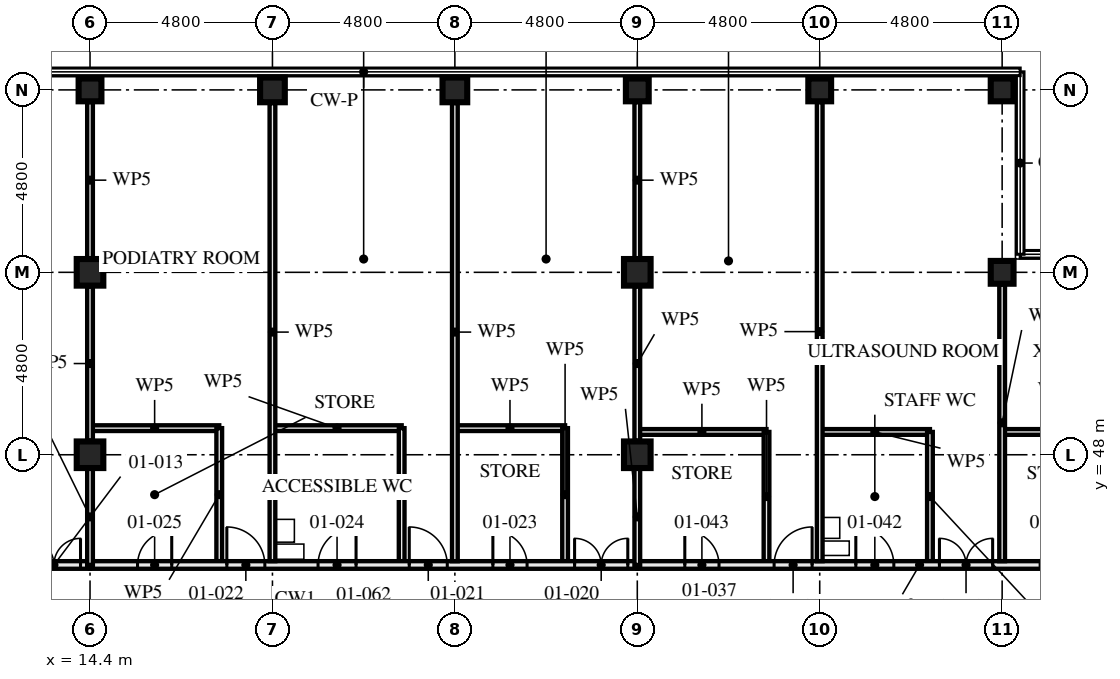
"""IFC4 building model, lengths in metres.
Left out: names, types, materials, properties, quantities, classifications, styles, units other than length and angle.
Written with IfcOpenShell. Run it as: python <this file> out.ifc"""

import sys

from ifc_helpers import new_model, si_unit, direction, frame, frame_2d, origin, origin_2d, place, context, subcontext, project, spatial, rectangle, hollow_rectangle, extrude, element, fill, save


model = new_model("IFC4")
c1 = context("Model", 3, precision=1e-05, world=origin(), true_north=direction((0.0, 1.0)))
c2 = subcontext(c1, "Body", "Model", "MODEL_VIEW")
j1 = project(units=[si_unit("LENGTHUNIT", "METRE"), si_unit("PLANEANGLEUNIT", "RADIAN")], contexts=[c1])
p1 = place(None, origin())
s1 = spatial("IfcSite", under=j1, at=p1, CompositionType="ELEMENT")
p2 = place(p1, origin())
s2 = spatial("IfcBuilding", under=s1, at=p2, CompositionType="ELEMENT")
p3 = place(p2, frame((0.0, 0.0, 4.5)))
s3 = spatial("IfcBuildingStorey", under=s2, at=p3, CompositionType="ELEMENT", Elevation=4.5)
for number, where, z_axis, x_axis in (
    (1, (14.4, 48.0, 0.0), (0.0, 0.0, 1.0), (1.0, 0.0, 0.0)),
    (2, (14.4, 52.8, 0.0), (0.0, 0.0, 1.0), (1.0, 0.0, 0.0)),
):
    element("IfcColumn", number, at=place(p3, frame(where, z_axis=z_axis, x_axis=x_axis)), inside=s3, PredefinedType="COLUMN", context=c2, shape_type="SweptSolid", body=[
        extrude(hollow_rectangle(XDim=0.7, YDim=0.7, WallThickness=0.06, at=origin_2d()), origin(), (0.0, 0.0, 1.0), 4.5),
    ])
p4 = place(p3, frame((14.4, 57.6, 0.0), z_axis=(0.0, 0.0, 1.0), x_axis=(0.0, 1.0, 0.0)))
e3 = element("IfcColumn", 3, at=p4, inside=s3, PredefinedType="COLUMN", context=c2, shape_type="SweptSolid", body=[
    extrude(hollow_rectangle(XDim=0.6, YDim=0.6, WallThickness=0.08, at=origin_2d()), origin(), (0.0, 0.0, 1.0), 4.5),
])
for number, where, z_axis, x_axis in (
    (4, (19.2, 57.6, 0.0), (0.0, 0.0, 1.0), (0.0, 1.0, 0.0)),
    (5, (24.0, 57.6, 0.0), (0.0, 0.0, 1.0), (0.0, 1.0, 0.0)),
):
    element("IfcColumn", number, at=place(p3, frame(where, z_axis=z_axis, x_axis=x_axis)), inside=s3, PredefinedType="COLUMN", context=c2, shape_type="SweptSolid", body=[
        extrude(hollow_rectangle(XDim=0.65, YDim=0.65, WallThickness=0.08, at=origin_2d()), origin(), (0.0, 0.0, 1.0), 4.5),
    ])
for number, where, z_axis, x_axis in (
    (6, (28.8, 48.0, 0.0), (0.0, 0.0, 1.0), (1.0, 0.0, 0.0)),
    (7, (28.8, 52.8, 0.0), (0.0, 0.0, 1.0), (1.0, 0.0, 0.0)),
):
    element("IfcColumn", number, at=place(p3, frame(where, z_axis=z_axis, x_axis=x_axis)), inside=s3, PredefinedType="COLUMN", context=c2, shape_type="SweptSolid", body=[
        extrude(hollow_rectangle(XDim=0.7, YDim=0.7, WallThickness=0.06, at=origin_2d()), origin(), (0.0, 0.0, 1.0), 4.5),
    ])
for number, where, z_axis, x_axis in (
    (8, (28.8, 57.6, 0.0), (0.0, 0.0, 1.0), (0.0, 1.0, 0.0)),
    (9, (33.6, 57.6, 0.0), (0.0, 0.0, 1.0), (0.0, 1.0, 0.0)),
):
    element("IfcColumn", number, at=place(p3, frame(where, z_axis=z_axis, x_axis=x_axis)), inside=s3, PredefinedType="COLUMN", context=c2, shape_type="SweptSolid", body=[
        extrude(hollow_rectangle(XDim=0.6, YDim=0.6, WallThickness=0.08, at=origin_2d()), origin(), (0.0, 0.0, 1.0), 4.5),
    ])
for number, where, z_axis, x_axis in (
    (10, (38.4, 52.8, 0.0), (0.0, 0.0, 1.0), (0.0, 1.0, 0.0)),
    (11, (38.4, 57.6, 0.0), (0.0, 0.0, 1.0), (0.0, 1.0, 0.0)),
):
    element("IfcColumn", number, at=place(p3, frame(where, z_axis=z_axis, x_axis=x_axis)), inside=s3, PredefinedType="COLUMN", context=c2, shape_type="SweptSolid", body=[
        extrude(hollow_rectangle(XDim=0.6, YDim=0.6, WallThickness=0.06, at=origin_2d()), origin(), (0.0, 0.0, 1.0), 4.5),
    ])
p5 = place(p3, frame((14.4, 45.1, 0.0), z_axis=(0.0, 0.0, 1.0), x_axis=(-1.0, 0.0, 0.0)))
e12 = element("IfcWall", 12, at=p5, inside=s3, PredefinedType="PARTITIONING", context=c2, shape_type="SweptSolid", body=[
    extrude(rectangle(XDim=14.855, YDim=0.2, at=frame_2d((7.427, 0.0))), origin(), (0.0, 0.0, 1.0), 3.32),
])
p6 = place(p5, frame((0.25, 0.0, 0.0)))
e13 = element("IfcOpeningElement", 13, at=p6, cuts=e12, PredefinedType="OPENING", context=c2, shape_type="SweptSolid", body=[
    extrude(rectangle(XDim=1.4, YDim=2.4, at=frame_2d((0.7, 1.2))), frame((0.0, 0.111, 0.0), z_axis=(0.0, -1.0, 0.0), x_axis=(1.0, 0.0, 0.0)), (0.0, 0.0, 1.0), 0.221),
])
p7 = place(p5, frame((5.05, 0.0, 0.0)))
e14 = element("IfcOpeningElement", 14, at=p7, cuts=e12, PredefinedType="OPENING", context=c2, shape_type="SweptSolid", body=[
    extrude(rectangle(XDim=1.4, YDim=2.4, at=frame_2d((0.7, 1.2))), frame((0.0, 0.111, 0.0), z_axis=(0.0, -1.0, 0.0), x_axis=(1.0, 0.0, 0.0)), (0.0, 0.0, 1.0), 0.221),
])
p8 = place(p5, frame((9.8, 0.0, 0.0)))
e15 = element("IfcOpeningElement", 15, at=p8, cuts=e12, PredefinedType="OPENING", context=c2, shape_type="SweptSolid", body=[
    extrude(rectangle(XDim=1.0, YDim=2.4, at=frame_2d((0.5, 1.2))), frame((0.0, 0.111, 0.0), z_axis=(0.0, -1.0, 0.0), x_axis=(1.0, 0.0, 0.0)), (0.0, 0.0, 1.0), 0.221),
])
p9 = place(p5, frame((2.9, 0.0, 0.0)))
e16 = element("IfcOpeningElement", 16, at=p9, cuts=e12, PredefinedType="OPENING", context=c2, shape_type="SweptSolid", body=[
    extrude(rectangle(XDim=0.9, YDim=2.1, at=frame_2d((0.45, 1.05))), frame((0.0, 0.111, 0.0), z_axis=(0.0, -1.0, 0.0), x_axis=(1.0, 0.0, 0.0)), (0.0, 0.0, 1.0), 0.221),
])
p10 = place(p5, frame((7.65, 0.0, 0.0)))
e17 = element("IfcOpeningElement", 17, at=p10, cuts=e12, PredefinedType="OPENING", context=c2, shape_type="SweptSolid", body=[
    extrude(rectangle(XDim=1.0, YDim=2.1, at=frame_2d((0.5, 1.05))), frame((0.0, 0.111, 0.0), z_axis=(0.0, -1.0, 0.0), x_axis=(1.0, 0.0, 0.0)), (0.0, 0.0, 1.0), 0.221),
])
p11 = place(p5, frame((12.25, 0.0, 0.0)))
e18 = element("IfcOpeningElement", 18, at=p11, cuts=e12, PredefinedType="OPENING", context=c2, shape_type="SweptSolid", body=[
    extrude(rectangle(XDim=0.9, YDim=2.1, at=frame_2d((0.45, 1.05))), frame((0.0, 0.111, 0.0), z_axis=(0.0, -1.0, 0.0), x_axis=(1.0, 0.0, 0.0)), (0.0, 0.0, 1.0), 0.221),
])
p12 = place(p3, frame((26.9, 48.7, 0.0), z_axis=(0.0, 0.0, 1.0), x_axis=(0.0, -1.0, 0.0)))
e19 = element("IfcWall", 19, at=p12, inside=s3, PredefinedType="PARTITIONING", context=c2, shape_type="SweptSolid", body=[
    extrude(rectangle(XDim=3.5, YDim=0.15, at=frame_2d((1.75, 0.0))), origin(), (0.0, 0.0, 1.0), 3.55),
])
p13 = place(p3, frame((26.9, 48.7, 0.0), z_axis=(0.0, 0.0, 1.0), x_axis=(-1.0, 0.0, 0.0)))
e20 = element("IfcWall", 20, at=p13, inside=s3, PredefinedType="PARTITIONING", context=c2, shape_type="SweptSolid", body=[
    extrude(rectangle(XDim=2.9, YDim=0.15, at=frame_2d((1.45, 0.0))), origin(), (0.0, 0.0, 1.0), 4.33),
])
p14 = place(p3, frame((22.6, 48.7, 0.0), z_axis=(0.0, 0.0, 1.0), x_axis=(0.0, -1.0, 0.0)))
e21 = element("IfcWall", 21, at=p14, inside=s3, PredefinedType="PARTITIONING", context=c2, shape_type="SweptSolid", body=[
    extrude(rectangle(XDim=3.5, YDim=0.15, at=frame_2d((1.75, 0.0))), origin(), (0.0, 0.0, 1.0), 3.55),
])
p15 = place(p3, frame((22.6, 48.7, 0.0), z_axis=(0.0, 0.0, 1.0), x_axis=(-1.0, 0.0, 0.0)))
e22 = element("IfcWall", 22, at=p15, inside=s3, PredefinedType="PARTITIONING", context=c2, shape_type="SweptSolid", body=[
    extrude(rectangle(XDim=3.4, YDim=0.15, at=frame_2d((1.7, 0.0))), origin(), (0.0, 0.0, 1.0), 4.33),
])
p16 = place(p3, frame((17.8, 48.7, 0.0), z_axis=(0.0, 0.0, 1.0), x_axis=(0.0, -1.0, 0.0)))
e23 = element("IfcWall", 23, at=p16, inside=s3, PredefinedType="PARTITIONING", context=c2, shape_type="SweptSolid", body=[
    extrude(rectangle(XDim=3.5, YDim=0.15, at=frame_2d((1.75, 0.0))), origin(), (0.0, 0.0, 1.0), 3.55),
])
p17 = place(p3, frame((17.8, 48.7, 0.0), z_axis=(0.0, 0.0, 1.0), x_axis=(-1.0, 0.0, 0.0)))
e24 = element("IfcWall", 24, at=p17, inside=s3, PredefinedType="PARTITIONING", context=c2, shape_type="SweptSolid", body=[
    extrude(rectangle(XDim=3.4, YDim=0.15, at=frame_2d((1.7, 0.0))), origin(), (0.0, 0.0, 1.0), 4.33),
])
for number, where, z_axis, x_axis in (
    (25, (24.0, 57.255, 0.0), (0.0, 0.0, 1.0), (0.0, -1.0, 0.0)),
    (26, (19.2, 57.255, 0.0), (0.0, 0.0, 1.0), (0.0, -1.0, 0.0)),
):
    element("IfcWall", number, at=place(p3, frame(where, z_axis=z_axis, x_axis=x_axis)), inside=s3, PredefinedType="PARTITIONING", context=c2, shape_type="SweptSolid", body=[
        extrude(rectangle(XDim=12.055, YDim=0.15, at=frame_2d((6.027, 0.0))), origin(), (0.0, 0.0, 1.0), 3.55),
    ])
p18 = place(p3, frame((28.8, 45.1, 0.0), z_axis=(0.0, 0.0, 1.0), x_axis=(-1.0, 0.0, 0.0)))
e27 = element("IfcWall", 27, at=p18, inside=s3, PredefinedType="PARTITIONING", context=c2, shape_type="SweptSolid", body=[
    extrude(rectangle(XDim=14.4, YDim=0.2, at=frame_2d((7.2, 0.0))), origin(), (0.0, 0.0, 1.0), 4.33),
])
p19 = place(p18, frame((0.25, 0.0, 0.0)))
e28 = element("IfcOpeningElement", 28, at=p19, cuts=e27, PredefinedType="OPENING", context=c2, shape_type="SweptSolid", body=[
    extrude(rectangle(XDim=1.4, YDim=2.4, at=frame_2d((0.7, 1.2))), frame((0.0, 0.111, 0.0), z_axis=(0.0, -1.0, 0.0), x_axis=(1.0, 0.0, 0.0)), (0.0, 0.0, 1.0), 0.221),
])
p20 = place(p18, frame((5.0, 0.0, 0.0)))
e29 = element("IfcOpeningElement", 29, at=p20, cuts=e27, PredefinedType="OPENING", context=c2, shape_type="SweptSolid", body=[
    extrude(rectangle(XDim=1.0, YDim=2.4, at=frame_2d((0.5, 1.2))), frame((0.0, 0.111, 0.0), z_axis=(0.0, -1.0, 0.0), x_axis=(1.0, 0.0, 0.0)), (0.0, 0.0, 1.0), 0.221),
])
p21 = place(p18, frame((9.8, 0.0, 0.0)))
e30 = element("IfcOpeningElement", 30, at=p21, cuts=e27, PredefinedType="OPENING", context=c2, shape_type="SweptSolid", body=[
    extrude(rectangle(XDim=1.0, YDim=2.4, at=frame_2d((0.5, 1.2))), frame((0.0, 0.111, 0.0), z_axis=(0.0, -1.0, 0.0), x_axis=(1.0, 0.0, 0.0)), (0.0, 0.0, 1.0), 0.221),
])
p22 = place(p18, frame((2.9, 0.0, 0.0)))
e31 = element("IfcOpeningElement", 31, at=p22, cuts=e27, PredefinedType="OPENING", context=c2, shape_type="SweptSolid", body=[
    extrude(rectangle(XDim=0.9, YDim=2.1, at=frame_2d((0.45, 1.05))), frame((0.0, 0.111, 0.0), z_axis=(0.0, -1.0, 0.0), x_axis=(1.0, 0.0, 0.0)), (0.0, 0.0, 1.0), 0.221),
])
p23 = place(p18, frame((7.4, 0.0, 0.0)))
e32 = element("IfcOpeningElement", 32, at=p23, cuts=e27, PredefinedType="OPENING", context=c2, shape_type="SweptSolid", body=[
    extrude(rectangle(XDim=1.0, YDim=2.1, at=frame_2d((0.5, 1.05))), frame((0.0, 0.111, 0.0), z_axis=(0.0, -1.0, 0.0), x_axis=(1.0, 0.0, 0.0)), (0.0, 0.0, 1.0), 0.221),
])
p24 = place(p18, frame((12.25, 0.0, 0.0)))
e33 = element("IfcOpeningElement", 33, at=p24, cuts=e27, PredefinedType="OPENING", context=c2, shape_type="SweptSolid", body=[
    extrude(rectangle(XDim=0.9, YDim=2.1, at=frame_2d((0.45, 1.05))), frame((0.0, 0.111, 0.0), z_axis=(0.0, -1.0, 0.0), x_axis=(1.0, 0.0, 0.0)), (0.0, 0.0, 1.0), 0.221),
])
p25 = place(p3, frame((41.3, 48.6, 0.0), z_axis=(0.0, 0.0, 1.0), x_axis=(-1.0, 0.0, 0.0)))
e34 = element("IfcWall", 34, at=p25, inside=s3, PredefinedType="PARTITIONING", context=c2, shape_type="SweptSolid", body=[
    extrude(rectangle(XDim=2.9, YDim=0.15, at=frame_2d((1.45, 0.0))), origin(), (0.0, 0.0, 1.0), 4.33),
])
p26 = place(p3, frame((36.5, 48.6, 0.0), z_axis=(0.0, 0.0, 1.0), x_axis=(0.0, -1.0, 0.0)))
e35 = element("IfcWall", 35, at=p26, inside=s3, PredefinedType="PARTITIONING", context=c2, shape_type="SweptSolid", body=[
    extrude(rectangle(XDim=3.4, YDim=0.15, at=frame_2d((1.7, 0.0))), origin(), (0.0, 0.0, 1.0), 3.32),
])
p27 = place(p3, frame((36.5, 48.6, 0.0), z_axis=(0.0, 0.0, 1.0), x_axis=(-1.0, 0.0, 0.0)))
e36 = element("IfcWall", 36, at=p27, inside=s3, PredefinedType="PARTITIONING", context=c2, shape_type="SweptSolid", body=[
    extrude(rectangle(XDim=2.9, YDim=0.15, at=frame_2d((1.45, 0.0))), origin(), (0.0, 0.0, 1.0), 4.33),
])
p28 = place(p3, frame((32.2, 48.6, 0.0), z_axis=(0.0, 0.0, 1.0), x_axis=(0.0, -1.0, 0.0)))
e37 = element("IfcWall", 37, at=p28, inside=s3, PredefinedType="PARTITIONING", context=c2, shape_type="SweptSolid", body=[
    extrude(rectangle(XDim=3.4, YDim=0.15, at=frame_2d((1.7, 0.0))), origin(), (0.0, 0.0, 1.0), 3.32),
])
p29 = place(p3, frame((32.2, 48.6, 0.0), z_axis=(0.0, 0.0, 1.0), x_axis=(-1.0, 0.0, 0.0)))
e38 = element("IfcWall", 38, at=p29, inside=s3, PredefinedType="PARTITIONING", context=c2, shape_type="SweptSolid", body=[
    extrude(rectangle(XDim=3.4, YDim=0.15, at=frame_2d((1.7, 0.0))), origin(), (0.0, 0.0, 1.0), 4.33),
])
p30 = place(p3, frame((38.4, 52.48, 0.0), z_axis=(0.0, 0.0, 1.0), x_axis=(0.0, -1.0, 0.0)))
e39 = element("IfcWall", 39, at=p30, inside=s3, PredefinedType="PARTITIONING", context=c2, shape_type="SweptSolid", body=[
    extrude(rectangle(XDim=7.28, YDim=0.15, at=frame_2d((3.64, 0.0))), origin(), (0.0, 0.0, 1.0), 3.32),
])
p31 = place(p3, frame((33.6, 57.28, 0.0), z_axis=(0.0, 0.0, 1.0), x_axis=(0.0, -1.0, 0.0)))
e40 = element("IfcWall", 40, at=p31, inside=s3, PredefinedType="PARTITIONING", context=c2, shape_type="SweptSolid", body=[
    extrude(rectangle(XDim=12.08, YDim=0.15, at=frame_2d((6.04, 0.0))), origin(), (0.0, 0.0, 1.0), 3.32),
])
p32 = place(p3, frame((43.655, 45.1, 0.0), z_axis=(0.0, 0.0, 1.0), x_axis=(-1.0, 0.0, 0.0)))
e41 = element("IfcWall", 41, at=p32, inside=s3, PredefinedType="PARTITIONING", context=c2, shape_type="SweptSolid", body=[
    extrude(rectangle(XDim=14.855, YDim=0.2, at=frame_2d((7.427, 0.0))), origin(), (0.0, 0.0, 1.0), 3.32),
])
p33 = place(p32, frame((0.705, 0.0, 0.0)))
e42 = element("IfcOpeningElement", 42, at=p33, cuts=e41, PredefinedType="OPENING", context=c2, shape_type="SweptSolid", body=[
    extrude(rectangle(XDim=1.4, YDim=2.4, at=frame_2d((0.7, 1.2))), frame((0.0, 0.111, 0.0), z_axis=(0.0, -1.0, 0.0), x_axis=(1.0, 0.0, 0.0)), (0.0, 0.0, 1.0), 0.221),
])
p34 = place(p32, frame((5.505, 0.0, 0.0)))
e43 = element("IfcOpeningElement", 43, at=p34, cuts=e41, PredefinedType="OPENING", context=c2, shape_type="SweptSolid", body=[
    extrude(rectangle(XDim=1.4, YDim=2.4, at=frame_2d((0.7, 1.2))), frame((0.0, 0.111, 0.0), z_axis=(0.0, -1.0, 0.0), x_axis=(1.0, 0.0, 0.0)), (0.0, 0.0, 1.0), 0.221),
])
p35 = place(p32, frame((10.255, 0.0, 0.0)))
e44 = element("IfcOpeningElement", 44, at=p35, cuts=e41, PredefinedType="OPENING", context=c2, shape_type="SweptSolid", body=[
    extrude(rectangle(XDim=1.0, YDim=2.4, at=frame_2d((0.5, 1.2))), frame((0.0, 0.111, 0.0), z_axis=(0.0, -1.0, 0.0), x_axis=(1.0, 0.0, 0.0)), (0.0, 0.0, 1.0), 0.221),
])
p36 = place(p32, frame((3.355, 0.0, 0.0)))
e45 = element("IfcOpeningElement", 45, at=p36, cuts=e41, PredefinedType="OPENING", context=c2, shape_type="SweptSolid", body=[
    extrude(rectangle(XDim=0.9, YDim=2.1, at=frame_2d((0.45, 1.05))), frame((0.0, 0.111, 0.0), z_axis=(0.0, -1.0, 0.0), x_axis=(1.0, 0.0, 0.0)), (0.0, 0.0, 1.0), 0.221),
])
p37 = place(p32, frame((8.105, 0.0, 0.0)))
e46 = element("IfcOpeningElement", 46, at=p37, cuts=e41, PredefinedType="OPENING", context=c2, shape_type="SweptSolid", body=[
    extrude(rectangle(XDim=1.0, YDim=2.1, at=frame_2d((0.5, 1.05))), frame((0.0, 0.111, 0.0), z_axis=(0.0, -1.0, 0.0), x_axis=(1.0, 0.0, 0.0)), (0.0, 0.0, 1.0), 0.221),
])
p38 = place(p32, frame((12.705, 0.0, 0.0)))
e47 = element("IfcOpeningElement", 47, at=p38, cuts=e41, PredefinedType="OPENING", context=c2, shape_type="SweptSolid", body=[
    extrude(rectangle(XDim=0.9, YDim=2.1, at=frame_2d((0.45, 1.05))), frame((0.0, 0.111, 0.0), z_axis=(0.0, -1.0, 0.0), x_axis=(1.0, 0.0, 0.0)), (0.0, 0.0, 1.0), 0.221),
])
p39 = place(p3, frame((14.4, 45.1, 0.0), z_axis=(0.0, 0.0, 1.0), x_axis=(0.0, 1.0, 0.0)))
e48 = element("IfcWall", 48, at=p39, inside=s3, PredefinedType="PARTITIONING", context=c2, shape_type="SweptSolid", body=[
    extrude(rectangle(XDim=2.53, YDim=0.15, at=frame_2d((1.265, 0.0))), origin(), (0.0, 0.0, 1.0), 3.32),
])
p40 = place(p3, frame((14.4, 48.37, 0.0), z_axis=(0.0, 0.0, 1.0), x_axis=(0.0, 1.0, 0.0)))
e49 = element("IfcWall", 49, at=p40, inside=s3, PredefinedType="PARTITIONING", context=c2, shape_type="SweptSolid", body=[
    extrude(rectangle(XDim=4.06, YDim=0.15, at=frame_2d((2.03, 0.0))), origin(), (0.0, 0.0, 1.0), 3.32),
])
p41 = place(p3, frame((14.4, 53.17, 0.0), z_axis=(0.0, 0.0, 1.0), x_axis=(0.0, 1.0, 0.0)))
e50 = element("IfcWall", 50, at=p41, inside=s3, PredefinedType="PARTITIONING", context=c2, shape_type="SweptSolid", body=[
    extrude(rectangle(XDim=4.11, YDim=0.15, at=frame_2d((2.055, 0.0))), origin(), (0.0, 0.0, 1.0), 3.32),
])
p42 = place(p3, frame((28.8, 45.1, 0.0), z_axis=(0.0, 0.0, 1.0), x_axis=(0.0, 1.0, 0.0)))
e51 = element("IfcWall", 51, at=p42, inside=s3, PredefinedType="PARTITIONING", context=c2, shape_type="SweptSolid", body=[
    extrude(rectangle(XDim=2.53, YDim=0.15, at=frame_2d((1.265, 0.0))), origin(), (0.0, 0.0, 1.0), 3.32),
])
p43 = place(p3, frame((28.8, 48.37, 0.0), z_axis=(0.0, 0.0, 1.0), x_axis=(0.0, 1.0, 0.0)))
e52 = element("IfcWall", 52, at=p43, inside=s3, PredefinedType="PARTITIONING", context=c2, shape_type="SweptSolid", body=[
    extrude(rectangle(XDim=4.06, YDim=0.15, at=frame_2d((2.03, 0.0))), origin(), (0.0, 0.0, 1.0), 3.32),
])
p44 = place(p3, frame((28.8, 53.17, 0.0), z_axis=(0.0, 0.0, 1.0), x_axis=(0.0, 1.0, 0.0)))
e53 = element("IfcWall", 53, at=p44, inside=s3, PredefinedType="PARTITIONING", context=c2, shape_type="SweptSolid", body=[
    extrude(rectangle(XDim=4.11, YDim=0.15, at=frame_2d((2.055, 0.0))), origin(), (0.0, 0.0, 1.0), 3.32),
])
p45 = place(p6, frame((1.4, 0.0, 0.0), z_axis=(0.0, 0.0, 1.0), x_axis=(-1.0, 0.0, 0.0)))
e54 = element("IfcDoor", 54, at=p45, inside=s3, OperationType="DOUBLE_DOOR_SINGLE_SWING", PredefinedType="DOOR", context=c2, shape_type="SweptSolid", body=[
    extrude(rectangle(XDim=1.4, YDim=2.4, at=frame_2d((0.7, 1.2))), frame((0.0, 0.027, 0.0), z_axis=(0.0, -1.0, 0.0), x_axis=(1.0, 0.0, 0.0)), (0.0, 0.0, 1.0), 0.054),
])
fill(e13, e54)
p46 = place(p19, frame((1.4, 0.0, 0.0), z_axis=(0.0, 0.0, 1.0), x_axis=(-1.0, 0.0, 0.0)))
e55 = element("IfcDoor", 55, at=p46, inside=s3, OperationType="DOUBLE_DOOR_SINGLE_SWING", PredefinedType="DOOR", context=c2, shape_type="SweptSolid", body=[
    extrude(rectangle(XDim=1.4, YDim=2.4, at=frame_2d((0.7, 1.2))), frame((0.0, 0.027, 0.0), z_axis=(0.0, -1.0, 0.0), x_axis=(1.0, 0.0, 0.0)), (0.0, 0.0, 1.0), 0.054),
])
fill(e28, e55)
p47 = place(p20, frame((1.0, 0.0, 0.0), z_axis=(0.0, 0.0, 1.0), x_axis=(-1.0, 0.0, 0.0)))
e56 = element("IfcDoor", 56, at=p47, inside=s3, OperationType="SINGLE_SWING_RIGHT", PredefinedType="DOOR", context=c2, shape_type="SweptSolid", body=[
    extrude(rectangle(XDim=1.0, YDim=2.4, at=frame_2d((0.5, 1.2))), frame((0.0, 0.027, 0.0), z_axis=(0.0, -1.0, 0.0), x_axis=(1.0, 0.0, 0.0)), (0.0, 0.0, 1.0), 0.054),
])
fill(e29, e56)
p48 = place(p21, frame((1.0, 0.0, 0.0), z_axis=(0.0, 0.0, 1.0), x_axis=(-1.0, 0.0, 0.0)))
e57 = element("IfcDoor", 57, at=p48, inside=s3, OperationType="SINGLE_SWING_RIGHT", PredefinedType="DOOR", context=c2, shape_type="SweptSolid", body=[
    extrude(rectangle(XDim=1.0, YDim=2.4, at=frame_2d((0.5, 1.2))), frame((0.0, 0.027, 0.0), z_axis=(0.0, -1.0, 0.0), x_axis=(1.0, 0.0, 0.0)), (0.0, 0.0, 1.0), 0.054),
])
fill(e30, e57)
p49 = place(p22, frame((0.9, 0.0, 0.0), z_axis=(0.0, 0.0, 1.0), x_axis=(-1.0, 0.0, 0.0)))
e58 = element("IfcDoor", 58, at=p49, inside=s3, OperationType="SINGLE_SWING_RIGHT", PredefinedType="DOOR", context=c2, shape_type="SweptSolid", body=[
    extrude(rectangle(XDim=0.9, YDim=2.1, at=frame_2d((0.45, 1.05))), frame((0.0, 0.027, 0.0), z_axis=(0.0, -1.0, 0.0), x_axis=(1.0, 0.0, 0.0)), (0.0, 0.0, 1.0), 0.054),
])
fill(e31, e58)
p50 = place(p23, frame((1.0, 0.0, 0.0), z_axis=(0.0, 0.0, 1.0), x_axis=(-1.0, 0.0, 0.0)))
e59 = element("IfcDoor", 59, at=p50, inside=s3, OperationType="SINGLE_SWING_LEFT", PredefinedType="DOOR", context=c2, shape_type="SweptSolid", body=[
    extrude(rectangle(XDim=1.0, YDim=2.1, at=frame_2d((0.5, 1.05))), frame((0.0, 0.027, 0.0), z_axis=(0.0, -1.0, 0.0), x_axis=(1.0, 0.0, 0.0)), (0.0, 0.0, 1.0), 0.054),
])
fill(e32, e59)
p51 = place(p24, frame((0.9, 0.0, 0.0), z_axis=(0.0, 0.0, 1.0), x_axis=(-1.0, 0.0, 0.0)))
e60 = element("IfcDoor", 60, at=p51, inside=s3, OperationType="SINGLE_SWING_LEFT", PredefinedType="DOOR", context=c2, shape_type="SweptSolid", body=[
    extrude(rectangle(XDim=0.9, YDim=2.1, at=frame_2d((0.45, 1.05))), frame((0.0, 0.027, 0.0), z_axis=(0.0, -1.0, 0.0), x_axis=(1.0, 0.0, 0.0)), (0.0, 0.0, 1.0), 0.054),
])
fill(e33, e60)
p52 = place(p34, frame((1.4, 0.0, 0.0), z_axis=(0.0, 0.0, 1.0), x_axis=(-1.0, 0.0, 0.0)))
e61 = element("IfcDoor", 61, at=p52, inside=s3, OperationType="DOUBLE_DOOR_SINGLE_SWING", PredefinedType="DOOR", context=c2, shape_type="SweptSolid", body=[
    extrude(rectangle(XDim=1.4, YDim=2.4, at=frame_2d((0.7, 1.2))), frame((0.0, 0.027, 0.0), z_axis=(0.0, -1.0, 0.0), x_axis=(1.0, 0.0, 0.0)), (0.0, 0.0, 1.0), 0.054),
])
fill(e43, e61)
p53 = place(p35, frame((1.0, 0.0, 0.0), z_axis=(0.0, 0.0, 1.0), x_axis=(-1.0, 0.0, 0.0)))
e62 = element("IfcDoor", 62, at=p53, inside=s3, OperationType="SINGLE_SWING_LEFT", PredefinedType="DOOR", context=c2, shape_type="SweptSolid", body=[
    extrude(rectangle(XDim=1.0, YDim=2.4, at=frame_2d((0.5, 1.2))), frame((0.0, 0.027, 0.0), z_axis=(0.0, -1.0, 0.0), x_axis=(1.0, 0.0, 0.0)), (0.0, 0.0, 1.0), 0.054),
])
fill(e44, e62)
p54 = place(p37, frame((1.0, 0.0, 0.0), z_axis=(0.0, 0.0, 1.0), x_axis=(-1.0, 0.0, 0.0)))
e63 = element("IfcDoor", 63, at=p54, inside=s3, OperationType="SINGLE_SWING_RIGHT", PredefinedType="DOOR", context=c2, shape_type="SweptSolid", body=[
    extrude(rectangle(XDim=1.0, YDim=2.1, at=frame_2d((0.5, 1.05))), frame((0.0, 0.027, 0.0), z_axis=(0.0, -1.0, 0.0), x_axis=(1.0, 0.0, 0.0)), (0.0, 0.0, 1.0), 0.054),
])
fill(e46, e63)
p55 = place(p38, frame((0.9, 0.0, 0.0), z_axis=(0.0, 0.0, 1.0), x_axis=(-1.0, 0.0, 0.0)))
e64 = element("IfcDoor", 64, at=p55, inside=s3, OperationType="SINGLE_SWING_RIGHT", PredefinedType="DOOR", context=c2, shape_type="SweptSolid", body=[
    extrude(rectangle(XDim=0.9, YDim=2.1, at=frame_2d((0.45, 1.05))), frame((0.0, 0.027, 0.0), z_axis=(0.0, -1.0, 0.0), x_axis=(1.0, 0.0, 0.0)), (0.0, 0.0, 1.0), 0.054),
])
fill(e47, e64)
save(model, sys.argv[1])
